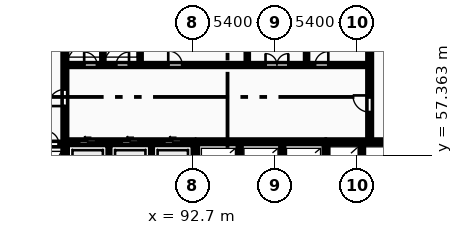
"""IFC4 building model, lengths in metres.
Left out: names, types, materials, properties, quantities, classifications, styles, units other than length and angle.
Written with IfcOpenShell. Run it as: python <this file> out.ifc"""

import sys

from ifc_helpers import new_model, si_unit, direction, frame, frame_2d, origin, place, context, subcontext, project, spatial, rectangle, extrude, element, fill, save


model = new_model("IFC4")
c1 = context("Model", 3, precision=1e-05, world=origin(), true_north=direction((0.0, 1.0)))
c2 = subcontext(c1, "Body", "Model", "MODEL_VIEW")
j1 = project(units=[si_unit("LENGTHUNIT", "METRE"), si_unit("PLANEANGLEUNIT", "RADIAN")], contexts=[c1])
p1 = place(None, origin())
s1 = spatial("IfcSite", under=j1, at=p1, CompositionType="ELEMENT")
p2 = place(p1, origin())
s2 = spatial("IfcBuilding", under=s1, at=p2, CompositionType="ELEMENT")
p3 = place(p2, frame((0.0, 0.0, -3.6)))
s3 = spatial("IfcBuildingStorey", under=s2, at=p3, CompositionType="ELEMENT", Elevation=-3.6)
p4 = place(p3, frame((79.79, 58.1, 0.0), z_axis=(0.0, 0.0, 1.0), x_axis=(1.0, 0.0, 0.0)))
e1 = element("IfcWall", 1, at=p4, inside=s3, PredefinedType="SHEAR", context=c2, shape_type="SweptSolid", body=[
    extrude(rectangle(XDim=4.39, YDim=0.25, at=frame_2d((2.195, 0.0))), origin(), (0.0, 0.0, 1.0), 3.6),
])
p5 = place(p4, frame((1.05, 0.0, 0.0)))
e2 = element("IfcOpeningElement", 2, at=p5, cuts=e1, PredefinedType="OPENING", context=c2, shape_type="SweptSolid", body=[
    extrude(rectangle(XDim=1.12, YDim=2.12, at=frame_2d((0.56, 1.06))), frame((0.0, 0.135, 0.0), z_axis=(0.0, -1.0, 0.0), x_axis=(1.0, 0.0, 0.0)), (0.0, 0.0, 1.0), 0.27),
])
p6 = place(p4, frame((3.26, 0.0, 0.0)))
e3 = element("IfcOpeningElement", 3, at=p6, cuts=e1, PredefinedType="OPENING", context=c2, shape_type="SweptSolid", body=[
    extrude(rectangle(XDim=0.85, YDim=2.05, at=frame_2d((0.425, 1.025))), frame((0.0, 0.135, 0.0), z_axis=(0.0, -1.0, 0.0), x_axis=(1.0, 0.0, 0.0)), (0.0, 0.0, 1.0), 0.27),
])
p7 = place(p3, frame((84.3, 55.4, 0.0), z_axis=(0.0, 0.0, 1.0), x_axis=(0.0, 1.0, 0.0)))
e4 = element("IfcWall", 4, at=p7, inside=s3, PredefinedType="SHEAR", context=c2, shape_type="SweptSolid", body=[
    extrude(rectangle(XDim=11.6, YDim=0.25, at=frame_2d((5.8, 0.0))), origin(), (0.0, 0.0, 1.0), 3.6),
])
p8 = place(p7, frame((5.2, 0.0, 0.0)))
e5 = element("IfcOpeningElement", 5, at=p8, cuts=e4, PredefinedType="OPENING", context=c2, shape_type="SweptSolid", body=[
    extrude(rectangle(XDim=1.1, YDim=2.1, at=frame_2d((0.55, 1.05))), frame((0.0, 0.135, 0.0), z_axis=(0.0, -1.0, 0.0), x_axis=(1.0, 0.0, 0.0)), (0.0, 0.0, 1.0), 0.27),
])
for number, where, z_axis, x_axis in (
    (6, (87.2, 55.4, 0.0), (0.0, 0.0, 1.0), (0.0, 1.0, 0.0)),
    (7, (90.0, 55.4, 0.0), (0.0, 0.0, 1.0), (0.0, 1.0, 0.0)),
):
    element("IfcWall", number, at=place(p3, frame(where, z_axis=z_axis, x_axis=x_axis)), inside=s3, PredefinedType="PARTITIONING", context=c2, shape_type="SweptSolid", body=[
        extrude(rectangle(XDim=2.72, YDim=0.2, at=frame_2d((1.36, 0.0))), origin(), (0.0, 0.0, 1.0), 3.3),
    ])
p9 = place(p3, frame((84.42, 58.25, 0.0), z_axis=(0.0, 0.0, 1.0), x_axis=(1.0, 0.0, 0.0)))
e8 = element("IfcWall", 8, at=p9, inside=s3, PredefinedType="SHEAR", context=c2, shape_type="SweptSolid", body=[
    extrude(rectangle(XDim=8.36, YDim=0.25, at=frame_2d((4.18, 0.0))), origin(), (0.0, 0.0, 1.0), 3.6),
])
p10 = place(p9, frame((0.82, 0.0, 0.0)))
e9 = element("IfcOpeningElement", 9, at=p10, cuts=e8, PredefinedType="OPENING", context=c2, shape_type="SweptSolid", body=[
    extrude(rectangle(XDim=1.12, YDim=2.12, at=frame_2d((0.56, 1.06))), frame((0.0, 0.135, 0.0), z_axis=(0.0, -1.0, 0.0), x_axis=(1.0, 0.0, 0.0)), (0.0, 0.0, 1.0), 0.27),
])
p11 = place(p9, frame((3.62, 0.0, 0.0)))
e10 = element("IfcOpeningElement", 10, at=p11, cuts=e8, PredefinedType="OPENING", context=c2, shape_type="SweptSolid", body=[
    extrude(rectangle(XDim=1.12, YDim=2.12, at=frame_2d((0.56, 1.06))), frame((0.0, 0.135, 0.0), z_axis=(0.0, -1.0, 0.0), x_axis=(1.0, 0.0, 0.0)), (0.0, 0.0, 1.0), 0.27),
])
p12 = place(p9, frame((6.42, 0.0, 0.0)))
e11 = element("IfcOpeningElement", 11, at=p12, cuts=e8, PredefinedType="OPENING", context=c2, shape_type="SweptSolid", body=[
    extrude(rectangle(XDim=1.12, YDim=2.12, at=frame_2d((0.56, 1.06))), frame((0.0, 0.135, 0.0), z_axis=(0.0, -1.0, 0.0), x_axis=(1.0, 0.0, 0.0)), (0.0, 0.0, 1.0), 0.27),
])
p13 = place(p3, frame((92.9, 55.4, 0.0), z_axis=(0.0, 0.0, 1.0), x_axis=(0.0, 1.0, 0.0)))
e12 = element("IfcWall", 12, at=p13, inside=s3, PredefinedType="SHEAR", context=c2, shape_type="SweptSolid", body=[
    extrude(rectangle(XDim=2.85, YDim=0.25, at=frame_2d((1.425, 0.0))), origin(), (0.0, 0.0, 1.0), 3.6),
])
for number, where, z_axis, x_axis in (
    (13, (95.8, 55.4, 0.0), (0.0, 0.0, 1.0), (0.0, 1.0, 0.0)),
    (14, (98.6, 55.4, 0.0), (0.0, 0.0, 1.0), (0.0, 1.0, 0.0)),
):
    element("IfcWall", number, at=place(p3, frame(where, z_axis=z_axis, x_axis=x_axis)), inside=s3, PredefinedType="PARTITIONING", context=c2, shape_type="SweptSolid", body=[
        extrude(rectangle(XDim=2.72, YDim=0.2, at=frame_2d((1.36, 0.0))), origin(), (0.0, 0.0, 1.0), 3.3),
    ])
p14 = place(p3, frame((93.02, 58.25, 0.0), z_axis=(0.0, 0.0, 1.0), x_axis=(1.0, 0.0, 0.0)))
e15 = element("IfcWall", 15, at=p14, inside=s3, PredefinedType="SHEAR", context=c2, shape_type="SweptSolid", body=[
    extrude(rectangle(XDim=8.36, YDim=0.25, at=frame_2d((4.18, 0.0))), origin(), (0.0, 0.0, 1.0), 3.6),
])
p15 = place(p3, frame((101.48, 55.4, 0.0), z_axis=(0.0, 0.0, 1.0), x_axis=(0.0, 1.0, 0.0)))
e16 = element("IfcWall", 16, at=p15, inside=s3, PredefinedType="SHEAR", context=c2, shape_type="SweptSolid", body=[
    extrude(rectangle(XDim=2.85, YDim=0.25, at=frame_2d((1.425, 0.0))), origin(), (0.0, 0.0, 1.0), 3.6),
])
p16 = place(p3, frame((103.85, 55.4, 0.0), z_axis=(0.0, 0.0, 1.0), x_axis=(0.0, 1.0, 0.0)))
e17 = element("IfcWall", 17, at=p16, inside=s3, PredefinedType="PARTITIONING", context=c2, shape_type="SweptSolid", body=[
    extrude(rectangle(XDim=2.72, YDim=0.2, at=frame_2d((1.36, 0.0))), origin(), (0.0, 0.0, 1.0), 3.3),
])
p17 = place(p3, frame((101.55, 58.25, 0.0), z_axis=(0.0, 0.0, 1.0), x_axis=(1.0, 0.0, 0.0)))
e18 = element("IfcWall", 18, at=p17, inside=s3, PredefinedType="SHEAR", context=c2, shape_type="SweptSolid", body=[
    extrude(rectangle(XDim=4.6, YDim=0.25, at=frame_2d((2.3, 0.0))), origin(), (0.0, 0.0, 1.0), 3.6),
])
for number, where, z_axis, x_axis in (
    (19, (86.8, 63.4, 0.0), (0.0, 0.0, 1.0), (0.0, 1.0, 0.0)),
    (20, (89.25, 63.4, 0.0), (0.0, 0.0, 1.0), (0.0, 1.0, 0.0)),
    (21, (96.3, 63.4, 0.0), (0.0, 0.0, 1.0), (0.0, 1.0, 0.0)),
    (22, (100.2, 63.4, 0.0), (0.0, 0.0, 1.0), (0.0, 1.0, 0.0)),
):
    element("IfcWall", number, at=place(p3, frame(where, z_axis=z_axis, x_axis=x_axis)), inside=s3, PredefinedType="PARTITIONING", context=c2, shape_type="SweptSolid", body=[
        extrude(rectangle(XDim=3.6, YDim=0.15, at=frame_2d((1.8, 0.0))), origin(), (0.0, 0.0, 1.0), 3.3),
    ])
p18 = place(p3, frame((84.42, 63.3, 0.0), z_axis=(0.0, 0.0, 1.0), x_axis=(1.0, 0.0, 0.0)))
e23 = element("IfcWall", 23, at=p18, inside=s3, PredefinedType="PARTITIONING", context=c2, shape_type="SweptSolid", body=[
    extrude(rectangle(XDim=19.83, YDim=0.2, at=frame_2d((9.915, 0.0))), origin(), (0.0, 0.0, 1.0), 3.3),
])
p19 = place(p18, frame((1.15, 0.0, 0.0)))
e24 = element("IfcOpeningElement", 24, at=p19, cuts=e23, PredefinedType="OPENING", context=c2, shape_type="SweptSolid", body=[
    extrude(rectangle(XDim=0.85, YDim=2.05, at=frame_2d((0.425, 1.025))), frame((0.0, 0.11, 0.0), z_axis=(0.0, -1.0, 0.0), x_axis=(1.0, 0.0, 0.0)), (0.0, 0.0, 1.0), 0.22),
])
p20 = place(p18, frame((3.25, 0.0, 0.0)))
e25 = element("IfcOpeningElement", 25, at=p20, cuts=e23, PredefinedType="OPENING", context=c2, shape_type="SweptSolid", body=[
    extrude(rectangle(XDim=0.85, YDim=2.05, at=frame_2d((0.425, 1.025))), frame((0.0, 0.11, 0.0), z_axis=(0.0, -1.0, 0.0), x_axis=(1.0, 0.0, 0.0)), (0.0, 0.0, 1.0), 0.22),
])
p21 = place(p18, frame((13.08, 0.0, 0.0)))
e26 = element("IfcOpeningElement", 26, at=p21, cuts=e23, PredefinedType="OPENING", context=c2, shape_type="SweptSolid", body=[
    extrude(rectangle(XDim=1.5, YDim=2.2, at=frame_2d((0.75, 1.1))), frame((0.0, 0.11, 0.0), z_axis=(0.0, -1.0, 0.0), x_axis=(1.0, 0.0, 0.0)), (0.0, 0.0, 1.0), 0.22),
])
p22 = place(p18, frame((6.68, 0.0, 0.0)))
e27 = element("IfcOpeningElement", 27, at=p22, cuts=e23, PredefinedType="OPENING", context=c2, shape_type="SweptSolid", body=[
    extrude(rectangle(XDim=0.92, YDim=2.08, at=frame_2d((0.46, 1.04))), frame((0.0, 0.11, 0.0), z_axis=(0.0, -1.0, 0.0), x_axis=(1.0, 0.0, 0.0)), (0.0, 0.0, 1.0), 0.22),
])
p23 = place(p18, frame((16.33, 0.0, 0.0)))
e28 = element("IfcOpeningElement", 28, at=p23, cuts=e23, PredefinedType="OPENING", context=c2, shape_type="SweptSolid", body=[
    extrude(rectangle(XDim=0.88, YDim=2.06, at=frame_2d((0.44, 1.03))), frame((0.0, 0.11, 0.0), z_axis=(0.0, -1.0, 0.0), x_axis=(1.0, 0.0, 0.0)), (0.0, 0.0, 1.0), 0.22),
])
p24 = place(p3, frame((104.35, 58.4, 0.0), z_axis=(0.0, 0.0, 1.0), x_axis=(0.0, 1.0, 0.0)))
e29 = element("IfcWall", 29, at=p24, inside=s3, PredefinedType="SHEAR", context=c2, shape_type="SweptSolid", body=[
    extrude(rectangle(XDim=8.6, YDim=0.25, at=frame_2d((4.3, 0.0))), origin(), (0.0, 0.0, 1.0), 3.6),
])
p25 = place(p24, frame((1.8, 0.0, 0.0)))
e30 = element("IfcOpeningElement", 30, at=p25, cuts=e29, PredefinedType="OPENING", context=c2, shape_type="SweptSolid", body=[
    extrude(rectangle(XDim=1.1, YDim=2.1, at=frame_2d((0.55, 1.05))), frame((0.0, 0.135, 0.0), z_axis=(0.0, -1.0, 0.0), x_axis=(1.0, 0.0, 0.0)), (0.0, 0.0, 1.0), 0.27),
])
p26 = place(p6, origin())
e31 = element("IfcDoor", 31, at=p26, inside=s3, OperationType="SINGLE_SWING_LEFT", PredefinedType="DOOR", context=c2, shape_type="SweptSolid", body=[
    extrude(rectangle(XDim=0.85, YDim=2.05, at=frame_2d((0.425, 1.025))), frame((0.0, 0.025, 0.0), z_axis=(0.0, -1.0, 0.0), x_axis=(1.0, 0.0, 0.0)), (0.0, 0.0, 1.0), 0.05),
])
fill(e3, e31)
p27 = place(p8, origin())
e32 = element("IfcDoor", 32, at=p27, inside=s3, OperationType="SINGLE_SWING_LEFT", PredefinedType="DOOR", context=c2, shape_type="SweptSolid", body=[
    extrude(rectangle(XDim=1.1, YDim=2.1, at=frame_2d((0.55, 1.05))), frame((0.0, 0.025, 0.0), z_axis=(0.0, -1.0, 0.0), x_axis=(1.0, 0.0, 0.0)), (0.0, 0.0, 1.0), 0.05),
])
fill(e5, e32)
p28 = place(p10, origin())
e33 = element("IfcDoor", 33, at=p28, inside=s3, OperationType="SLIDING_TO_LEFT", PredefinedType="DOOR", context=c2, shape_type="SweptSolid", body=[
    extrude(rectangle(XDim=1.12, YDim=2.12, at=frame_2d((0.56, 1.06))), frame((0.0, 0.025, 0.0), z_axis=(0.0, -1.0, 0.0), x_axis=(1.0, 0.0, 0.0)), (0.0, 0.0, 1.0), 0.05),
])
fill(e9, e33)
p29 = place(p11, origin())
e34 = element("IfcDoor", 34, at=p29, inside=s3, OperationType="SLIDING_TO_LEFT", PredefinedType="DOOR", context=c2, shape_type="SweptSolid", body=[
    extrude(rectangle(XDim=1.12, YDim=2.12, at=frame_2d((0.56, 1.06))), frame((0.0, 0.025, 0.0), z_axis=(0.0, -1.0, 0.0), x_axis=(1.0, 0.0, 0.0)), (0.0, 0.0, 1.0), 0.05),
])
fill(e10, e34)
p30 = place(p12, origin())
e35 = element("IfcDoor", 35, at=p30, inside=s3, OperationType="SLIDING_TO_LEFT", PredefinedType="DOOR", context=c2, shape_type="SweptSolid", body=[
    extrude(rectangle(XDim=1.12, YDim=2.12, at=frame_2d((0.56, 1.06))), frame((0.0, 0.025, 0.0), z_axis=(0.0, -1.0, 0.0), x_axis=(1.0, 0.0, 0.0)), (0.0, 0.0, 1.0), 0.05),
])
fill(e11, e35)
p31 = place(p19, origin())
e36 = element("IfcDoor", 36, at=p31, inside=s3, OperationType="SINGLE_SWING_LEFT", PredefinedType="DOOR", context=c2, shape_type="SweptSolid", body=[
    extrude(rectangle(XDim=0.85, YDim=2.05, at=frame_2d((0.425, 1.025))), frame((0.0, 0.025, 0.0), z_axis=(0.0, -1.0, 0.0), x_axis=(1.0, 0.0, 0.0)), (0.0, 0.0, 1.0), 0.05),
])
fill(e24, e36)
p32 = place(p20, origin())
e37 = element("IfcDoor", 37, at=p32, inside=s3, OperationType="SINGLE_SWING_RIGHT", PredefinedType="DOOR", context=c2, shape_type="SweptSolid", body=[
    extrude(rectangle(XDim=0.85, YDim=2.05, at=frame_2d((0.425, 1.025))), frame((0.0, 0.025, 0.0), z_axis=(0.0, -1.0, 0.0), x_axis=(1.0, 0.0, 0.0)), (0.0, 0.0, 1.0), 0.05),
])
fill(e25, e37)
p33 = place(p21, origin())
e38 = element("IfcDoor", 38, at=p33, inside=s3, OperationType="DOUBLE_DOOR_SINGLE_SWING", PredefinedType="DOOR", context=c2, shape_type="SweptSolid", body=[
    extrude(rectangle(XDim=1.5, YDim=2.2, at=frame_2d((0.75, 1.1))), frame((0.0, 0.025, 0.0), z_axis=(0.0, -1.0, 0.0), x_axis=(1.0, 0.0, 0.0)), (0.0, 0.0, 1.0), 0.05),
])
fill(e26, e38)
p34 = place(p22, origin())
e39 = element("IfcDoor", 39, at=p34, inside=s3, OperationType="SINGLE_SWING_LEFT", PredefinedType="DOOR", context=c2, shape_type="SweptSolid", body=[
    extrude(rectangle(XDim=0.92, YDim=2.08, at=frame_2d((0.46, 1.04))), frame((0.0, 0.025, 0.0), z_axis=(0.0, -1.0, 0.0), x_axis=(1.0, 0.0, 0.0)), (0.0, 0.0, 1.0), 0.05),
])
fill(e27, e39)
p35 = place(p23, origin())
e40 = element("IfcDoor", 40, at=p35, inside=s3, OperationType="SINGLE_SWING_RIGHT", PredefinedType="DOOR", context=c2, shape_type="SweptSolid", body=[
    extrude(rectangle(XDim=0.88, YDim=2.06, at=frame_2d((0.44, 1.03))), frame((0.0, 0.025, 0.0), z_axis=(0.0, -1.0, 0.0), x_axis=(1.0, 0.0, 0.0)), (0.0, 0.0, 1.0), 0.05),
])
fill(e28, e40)
p36 = place(p25, origin())
e41 = element("IfcDoor", 41, at=p36, inside=s3, OperationType="SINGLE_SWING_RIGHT", PredefinedType="DOOR", context=c2, shape_type="SweptSolid", body=[
    extrude(rectangle(XDim=1.1, YDim=2.1, at=frame_2d((0.55, 1.05))), frame((0.0, 0.025, 0.0), z_axis=(0.0, -1.0, 0.0), x_axis=(1.0, 0.0, 0.0)), (0.0, 0.0, 1.0), 0.05),
])
fill(e30, e41)
save(model, sys.argv[1])
